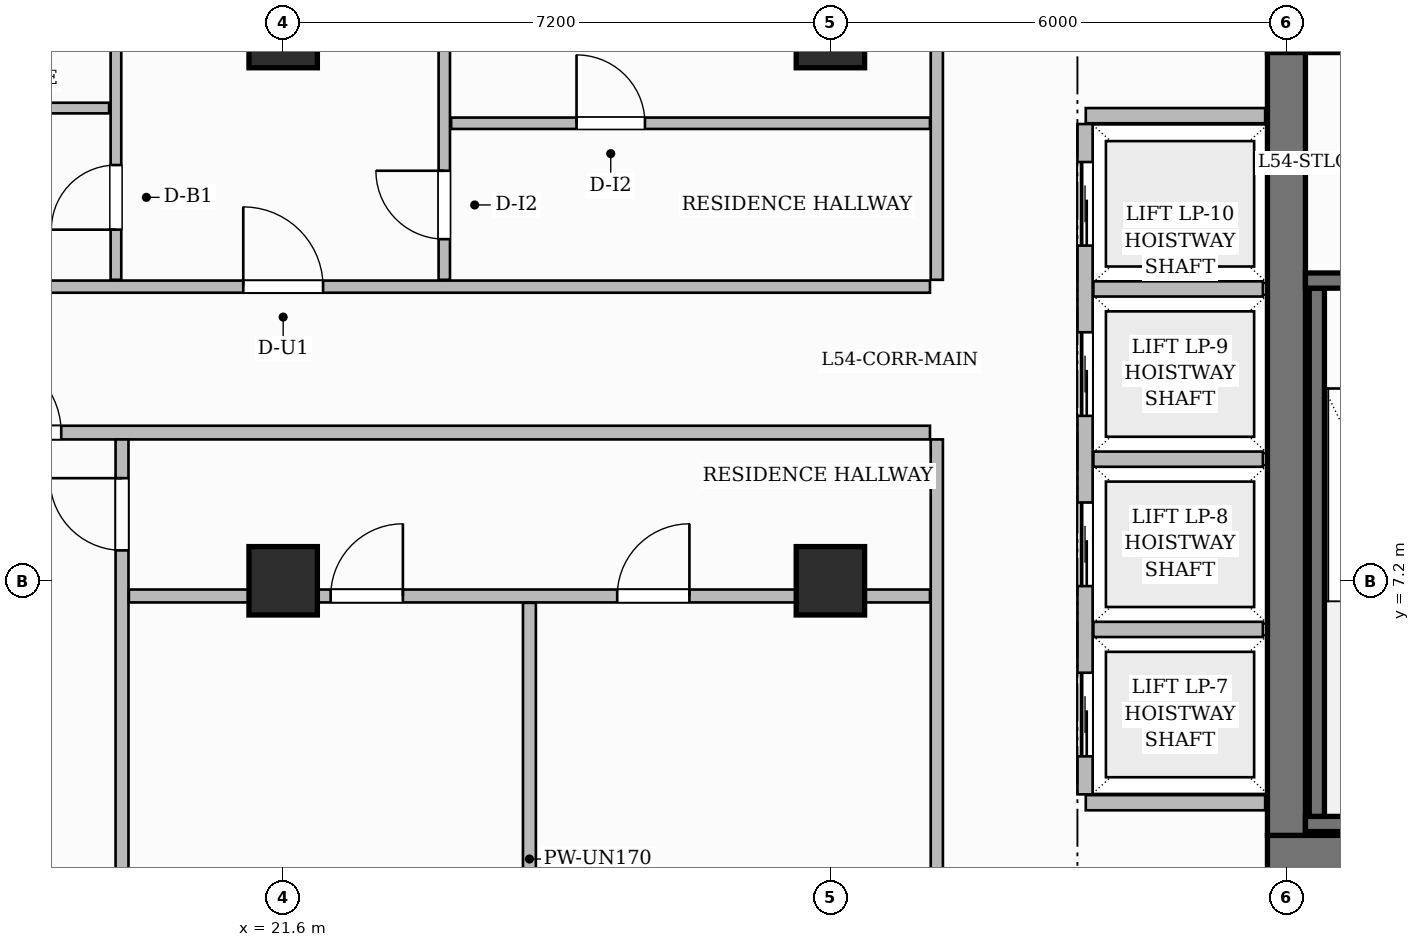
"""IFC4 building model, lengths in metres.
Left out: names, types, materials, properties, quantities, classifications, styles, units other than length and angle.
Written with IfcOpenShell. Run it as: python <this file> out.ifc"""

import sys

from ifc_helpers import new_model, si_unit, direction, frame, frame_2d, origin, origin_2d, place, context, subcontext, project, spatial, rectangle, extrude, source, transform, mapped, element, fill, save


model = new_model("IFC4")
c1 = context("Model", 3, precision=1e-05, world=origin(), true_north=direction((0.0, 1.0)))
c2 = subcontext(c1, "Body", "Model", "MODEL_VIEW")
j1 = project(units=[si_unit("LENGTHUNIT", "METRE"), si_unit("PLANEANGLEUNIT", "RADIAN")], contexts=[c1])
p1 = place(None, origin())
s1 = spatial("IfcSite", under=j1, at=p1, CompositionType="ELEMENT")
p2 = place(p1, origin())
s2 = spatial("IfcBuilding", under=s1, at=p2, CompositionType="ELEMENT")
p3 = place(p2, frame((0.0, 0.0, 217.3)))
s3 = spatial("IfcBuildingStorey", under=s2, at=p3, CompositionType="ELEMENT", Elevation=217.3)
p4 = place(p3, frame((34.55, 3.6, 0.0), z_axis=(0.0, 0.0, 1.0), x_axis=(1.0, 0.0, 0.0)))
e1 = element("IfcWall", 1, at=p4, inside=s3, PredefinedType="SHEAR", context=c2, shape_type="SweptSolid", body=[
    extrude(rectangle(XDim=15.5, YDim=0.5, at=frame_2d((7.75, 0.0))), origin(), (0.0, 0.0, 1.0), 3.85),
])
p5 = place(p4, frame((4.45, 0.0, 0.0)))
e2 = element("IfcOpeningElement", 2, at=p5, cuts=e1, PredefinedType="OPENING", context=c2, shape_type="SweptSolid", body=[
    extrude(rectangle(XDim=0.9, YDim=2.1, at=frame_2d((0.45, 1.05))), frame((0.0, 0.26, 0.0), z_axis=(0.0, -1.0, 0.0), x_axis=(1.0, 0.0, 0.0)), (0.0, 0.0, 1.0), 0.52),
])
p6 = place(p4, frame((6.9, 0.0, 0.0)))
e3 = element("IfcOpeningElement", 3, at=p6, cuts=e1, PredefinedType="OPENING", context=c2, shape_type="SweptSolid", body=[
    extrude(rectangle(XDim=0.9, YDim=2.1, at=frame_2d((0.45, 1.05))), frame((0.0, 0.26, 0.0), z_axis=(0.0, -1.0, 0.0), x_axis=(1.0, 0.0, 0.0)), (0.0, 0.0, 1.0), 0.52),
])
p7 = place(p3, frame((34.55, 14.4, 0.0), z_axis=(0.0, 0.0, 1.0), x_axis=(1.0, 0.0, 0.0)))
e4 = element("IfcWall", 4, at=p7, inside=s3, PredefinedType="SHEAR", context=c2, shape_type="SweptSolid", body=[
    extrude(rectangle(XDim=15.5, YDim=0.5, at=frame_2d((7.75, 0.0))), origin(), (0.0, 0.0, 1.0), 3.85),
])
p8 = place(p7, frame((5.38, 0.0, 0.0)))
e5 = element("IfcOpeningElement", 5, at=p8, cuts=e4, PredefinedType="OPENING", context=c2, shape_type="SweptSolid", body=[
    extrude(rectangle(XDim=1.5, YDim=2.2, at=frame_2d((0.75, 1.1))), frame((0.0, 0.26, 0.0), z_axis=(0.0, -1.0, 0.0), x_axis=(1.0, 0.0, 0.0)), (0.0, 0.0, 1.0), 0.52),
])
p9 = place(p7, frame((1.595, 0.0, 0.0)))
e6 = element("IfcOpeningElement", 6, at=p9, cuts=e4, PredefinedType="OPENING", context=c2, shape_type="SweptSolid", body=[
    extrude(rectangle(XDim=1.05, YDim=2.15, at=frame_2d((0.525, 1.075))), frame((0.0, 0.26, 0.0), z_axis=(0.0, -1.0, 0.0), x_axis=(1.0, 0.0, 0.0)), (0.0, 0.0, 1.0), 0.52),
])
p10 = place(p7, frame((11.225, 0.0, 0.0)))
e7 = element("IfcOpeningElement", 7, at=p10, cuts=e4, PredefinedType="OPENING", context=c2, shape_type="SweptSolid", body=[
    extrude(rectangle(XDim=1.05, YDim=2.15, at=frame_2d((0.525, 1.075))), frame((0.0, 0.26, 0.0), z_axis=(0.0, -1.0, 0.0), x_axis=(1.0, 0.0, 0.0)), (0.0, 0.0, 1.0), 0.52),
])
p11 = place(p3, frame((34.8, 3.85, 0.0), z_axis=(0.0, 0.0, 1.0), x_axis=(0.0, 1.0, 0.0)))
e8 = element("IfcWall", 8, at=p11, inside=s3, PredefinedType="SHEAR", context=c2, shape_type="SweptSolid", body=[
    extrude(rectangle(XDim=10.3, YDim=0.5, at=frame_2d((5.15, 0.0))), origin(), (0.0, 0.0, 1.0), 3.85),
])
m1 = source(origin(), c2, "Body", "SweptSolid", [
    extrude(rectangle(XDim=0.9, YDim=0.9, at=origin_2d()), origin(), (0.0, 0.0, 1.0), 3.85),
])
for number, where, z_axis, x_axis in (
    (9, (21.6, 7.2, 0.0), (0.0, 0.0, 1.0), (1.0, 0.0, 0.0)),
    (10, (21.6, 14.4, 0.0), (0.0, 0.0, 1.0), (1.0, 0.0, 0.0)),
    (11, (28.8, 7.2, 0.0), (0.0, 0.0, 1.0), (1.0, 0.0, 0.0)),
    (12, (28.8, 14.4, 0.0), (0.0, 0.0, 1.0), (1.0, 0.0, 0.0)),
):
    element("IfcColumn", number, at=place(p3, frame(where, z_axis=z_axis, x_axis=x_axis)), inside=s3, PredefinedType="COLUMN", context=c2, shape_type="MappedRepresentation", body=[
        mapped(m1, transform((0.0, 0.0, 0.0), scale=1.0)),
    ])
p12 = place(p3, frame((35.05, 4.0, 0.0), z_axis=(0.0, 0.0, 1.0), x_axis=(1.0, 0.0, 0.0)))
e13 = element("IfcWall", 13, at=p12, inside=s3, PredefinedType="SHEAR", context=c2, shape_type="SweptSolid", body=[
    extrude(rectangle(XDim=3.19, YDim=0.2, at=frame_2d((1.595, 0.0))), origin(), (0.0, 0.0, 1.0), 3.85),
])
p13 = place(p3, frame((35.2, 4.1, 0.0), z_axis=(0.0, 0.0, 1.0), x_axis=(0.0, 1.0, 0.0)))
e14 = element("IfcWall", 14, at=p13, inside=s3, PredefinedType="SHEAR", context=c2, shape_type="SweptSolid", body=[
    extrude(rectangle(XDim=6.95, YDim=0.2, at=frame_2d((3.475, 0.0))), origin(), (0.0, 0.0, 1.0), 3.85),
])
p14 = place(p3, frame((35.05, 11.15, 0.0), z_axis=(0.0, 0.0, 1.0), x_axis=(1.0, 0.0, 0.0)))
e15 = element("IfcWall", 15, at=p14, inside=s3, PredefinedType="SHEAR", context=c2, shape_type="SweptSolid", body=[
    extrude(rectangle(XDim=3.19, YDim=0.2, at=frame_2d((1.595, 0.0))), origin(), (0.0, 0.0, 1.0), 3.85),
])
p15 = place(p14, frame((1.095, 0.0, 0.0)))
e16 = element("IfcOpeningElement", 16, at=p15, cuts=e15, PredefinedType="OPENING", context=c2, shape_type="SweptSolid", body=[
    extrude(rectangle(XDim=1.05, YDim=2.2, at=frame_2d((0.525, 1.1))), frame((0.0, 0.11, 0.0), z_axis=(0.0, -1.0, 0.0), x_axis=(1.0, 0.0, 0.0)), (0.0, 0.0, 1.0), 0.22),
])
for number, where, z_axis, x_axis in (
    (17, (32.16, 4.28, 0.0), (0.0, 0.0, 1.0), (1.0, 0.0, 0.0)),
    (18, (32.16, 13.32, 0.0), (0.0, 0.0, 1.0), (1.0, 0.0, 0.0)),
):
    element("IfcWall", number, at=place(p3, frame(where, z_axis=z_axis, x_axis=x_axis)), inside=s3, PredefinedType="PARTITIONING", context=c2, shape_type="SweptSolid", body=[
        extrude(rectangle(XDim=2.36, YDim=0.2, at=frame_2d((1.18, 0.0))), origin(), (0.0, 0.0, 1.0), 3.6),
    ])
p16 = place(p3, frame((32.15, 4.39, 0.0), z_axis=(0.0, 0.0, 1.0), x_axis=(0.0, 1.0, 0.0)))
e19 = element("IfcWall", 19, at=p16, inside=s3, PredefinedType="PARTITIONING", context=c2, shape_type="SweptSolid", body=[
    extrude(rectangle(XDim=8.82, YDim=0.2, at=frame_2d((4.41, 0.0))), origin(), (0.0, 0.0, 1.0), 3.6),
])
p17 = place(p16, frame((0.5, 0.0, 0.0)))
e20 = element("IfcOpeningElement", 20, at=p17, cuts=e19, PredefinedType="OPENING", context=c2, shape_type="SweptSolid", body=[
    extrude(rectangle(XDim=1.1, YDim=2.2, at=frame_2d((0.55, 1.1))), frame((0.0, 0.11, 0.0), z_axis=(0.0, -1.0, 0.0), x_axis=(1.0, 0.0, 0.0)), (0.0, 0.0, 1.0), 0.22),
])
p18 = place(p16, frame((2.74, 0.0, 0.0)))
e21 = element("IfcOpeningElement", 21, at=p18, cuts=e19, PredefinedType="OPENING", context=c2, shape_type="SweptSolid", body=[
    extrude(rectangle(XDim=1.1, YDim=2.2, at=frame_2d((0.55, 1.1))), frame((0.0, 0.11, 0.0), z_axis=(0.0, -1.0, 0.0), x_axis=(1.0, 0.0, 0.0)), (0.0, 0.0, 1.0), 0.22),
])
p19 = place(p16, frame((4.98, 0.0, 0.0)))
e22 = element("IfcOpeningElement", 22, at=p19, cuts=e19, PredefinedType="OPENING", context=c2, shape_type="SweptSolid", body=[
    extrude(rectangle(XDim=1.1, YDim=2.2, at=frame_2d((0.55, 1.1))), frame((0.0, 0.11, 0.0), z_axis=(0.0, -1.0, 0.0), x_axis=(1.0, 0.0, 0.0)), (0.0, 0.0, 1.0), 0.22),
])
p20 = place(p16, frame((7.22, 0.0, 0.0)))
e23 = element("IfcOpeningElement", 23, at=p20, cuts=e19, PredefinedType="OPENING", context=c2, shape_type="SweptSolid", body=[
    extrude(rectangle(XDim=1.1, YDim=2.2, at=frame_2d((0.55, 1.1))), frame((0.0, 0.11, 0.0), z_axis=(0.0, -1.0, 0.0), x_axis=(1.0, 0.0, 0.0)), (0.0, 0.0, 1.0), 0.22),
])
for number, where, z_axis, x_axis in (
    (24, (32.26, 6.56, 0.0), (0.0, 0.0, 1.0), (1.0, 0.0, 0.0)),
    (25, (32.26, 8.8, 0.0), (0.0, 0.0, 1.0), (1.0, 0.0, 0.0)),
    (26, (32.26, 11.04, 0.0), (0.0, 0.0, 1.0), (1.0, 0.0, 0.0)),
):
    element("IfcWall", number, at=place(p3, frame(where, z_axis=z_axis, x_axis=x_axis)), inside=s3, PredefinedType="PARTITIONING", context=c2, shape_type="SweptSolid", body=[
        extrude(rectangle(XDim=2.23, YDim=0.2, at=frame_2d((1.115, 0.0))), origin(), (0.0, 0.0, 1.0), 3.6),
    ])
p21 = place(p3, frame((14.568, 9.15, 0.0), z_axis=(0.0, 0.0, 1.0), x_axis=(1.0, 0.0, 0.0)))
e27 = element("IfcWall", 27, at=p21, inside=s3, PredefinedType="PARTITIONING", context=c2, shape_type="SweptSolid", body=[
    extrude(rectangle(XDim=15.542, YDim=0.18, at=frame_2d((7.771, 0.0))), origin(), (0.0, 0.0, 1.0), 3.6),
])
p22 = place(p21, frame((3.062, 0.0, 0.0)))
e28 = element("IfcOpeningElement", 28, at=p22, cuts=e27, PredefinedType="OPENING", context=c2, shape_type="SweptSolid", body=[
    extrude(rectangle(XDim=1.05, YDim=2.25, at=frame_2d((0.525, 1.125))), frame((0.0, 0.1, 0.0), z_axis=(0.0, -1.0, 0.0), x_axis=(1.0, 0.0, 0.0)), (0.0, 0.0, 1.0), 0.2),
])
p23 = place(p3, frame((14.568, 11.07, 0.0), z_axis=(0.0, 0.0, 1.0), x_axis=(1.0, 0.0, 0.0)))
e29 = element("IfcWall", 29, at=p23, inside=s3, PredefinedType="PARTITIONING", context=c2, shape_type="SweptSolid", body=[
    extrude(rectangle(XDim=15.542, YDim=0.16, at=frame_2d((7.771, 0.0))), origin(), (0.0, 0.0, 1.0), 3.6),
])
p24 = place(p23, frame((0.507, 0.0, 0.0)))
e30 = element("IfcOpeningElement", 30, at=p24, cuts=e29, PredefinedType="OPENING", context=c2, shape_type="SweptSolid", body=[
    extrude(rectangle(XDim=1.4, YDim=2.35, at=frame_2d((0.7, 1.175))), frame((0.0, 0.09, 0.0), z_axis=(0.0, -1.0, 0.0), x_axis=(1.0, 0.0, 0.0)), (0.0, 0.0, 1.0), 0.18),
])
p25 = place(p23, frame((6.507, 0.0, 0.0)))
e31 = element("IfcOpeningElement", 31, at=p25, cuts=e29, PredefinedType="OPENING", context=c2, shape_type="SweptSolid", body=[
    extrude(rectangle(XDim=1.05, YDim=2.25, at=frame_2d((0.525, 1.125))), frame((0.0, 0.09, 0.0), z_axis=(0.0, -1.0, 0.0), x_axis=(1.0, 0.0, 0.0)), (0.0, 0.0, 1.0), 0.18),
])
p26 = place(p3, frame((30.2, 11.16, 0.0), z_axis=(0.0, 0.0, 1.0), x_axis=(0.0, 1.0, 0.0)))
e32 = element("IfcWall", 32, at=p26, inside=s3, PredefinedType="PARTITIONING", context=c2, shape_type="SweptSolid", body=[
    extrude(rectangle(XDim=10.3, YDim=0.16, at=frame_2d((5.15, 0.0))), origin(), (0.0, 0.0, 1.0), 3.6),
])
p27 = place(p3, frame((30.2, 0.168, 0.0), z_axis=(0.0, 0.0, 1.0), x_axis=(0.0, 1.0, 0.0)))
e33 = element("IfcWall", 33, at=p27, inside=s3, PredefinedType="PARTITIONING", context=c2, shape_type="SweptSolid", body=[
    extrude(rectangle(XDim=8.892, YDim=0.16, at=frame_2d((4.446, 0.0))), origin(), (0.0, 0.0, 1.0), 3.6),
])
p28 = place(p27, frame((1.957, 0.0, 0.0)))
e34 = element("IfcOpeningElement", 34, at=p28, cuts=e33, PredefinedType="OPENING", context=c2, shape_type="SweptSolid", body=[
    extrude(rectangle(XDim=1.05, YDim=2.15, at=frame_2d((0.525, 1.075))), frame((0.0, 0.09, 0.0), z_axis=(0.0, -1.0, 0.0), x_axis=(1.0, 0.0, 0.0)), (0.0, 0.0, 1.0), 0.18),
])
p29 = place(p3, frame((19.48, 0.168, 0.0), z_axis=(0.0, 0.0, 1.0), x_axis=(0.0, 1.0, 0.0)))
e35 = element("IfcWall", 35, at=p29, inside=s3, PredefinedType="PARTITIONING", context=c2, shape_type="SweptSolid", body=[
    extrude(rectangle(XDim=8.892, YDim=0.17, at=frame_2d((4.446, 0.0))), origin(), (0.0, 0.0, 1.0), 3.6),
])
p30 = place(p29, frame((7.432, 0.0, 0.0)))
e36 = element("IfcOpeningElement", 36, at=p30, cuts=e35, PredefinedType="OPENING", context=c2, shape_type="SweptSolid", body=[
    extrude(rectangle(XDim=0.95, YDim=2.15, at=frame_2d((0.475, 1.075))), frame((0.0, 0.095, 0.0), z_axis=(0.0, -1.0, 0.0), x_axis=(1.0, 0.0, 0.0)), (0.0, 0.0, 1.0), 0.19),
])
p31 = place(p3, frame((19.57, 7.0, 0.0), z_axis=(0.0, 0.0, 1.0), x_axis=(1.0, 0.0, 0.0)))
e37 = element("IfcWall", 37, at=p31, inside=s3, PredefinedType="PARTITIONING", context=c2, shape_type="SweptSolid", body=[
    extrude(rectangle(XDim=10.54, YDim=0.17, at=frame_2d((5.27, 0.0))), origin(), (0.0, 0.0, 1.0), 3.135),
])
p32 = place(p31, frame((2.655, 0.0, 0.0)))
e38 = element("IfcOpeningElement", 38, at=p32, cuts=e37, PredefinedType="OPENING", context=c2, shape_type="SweptSolid", body=[
    extrude(rectangle(XDim=0.95, YDim=2.15, at=frame_2d((0.475, 1.075))), frame((0.0, 0.095, 0.0), z_axis=(0.0, -1.0, 0.0), x_axis=(1.0, 0.0, 0.0)), (0.0, 0.0, 1.0), 0.19),
])
p33 = place(p31, frame((6.425, 0.0, 0.0)))
e39 = element("IfcOpeningElement", 39, at=p33, cuts=e37, PredefinedType="OPENING", context=c2, shape_type="SweptSolid", body=[
    extrude(rectangle(XDim=0.95, YDim=2.15, at=frame_2d((0.475, 1.075))), frame((0.0, 0.095, 0.0), z_axis=(0.0, -1.0, 0.0), x_axis=(1.0, 0.0, 0.0)), (0.0, 0.0, 1.0), 0.19),
])
p34 = place(p3, frame((24.84, 0.168, 0.0), z_axis=(0.0, 0.0, 1.0), x_axis=(0.0, 1.0, 0.0)))
e40 = element("IfcWall", 40, at=p34, inside=s3, PredefinedType="PARTITIONING", context=c2, shape_type="SweptSolid", body=[
    extrude(rectangle(XDim=6.742, YDim=0.17, at=frame_2d((3.371, 0.0))), origin(), (0.0, 0.0, 1.0), 3.6),
])
p35 = place(p3, frame((19.4, 11.16, 0.0), z_axis=(0.0, 0.0, 1.0), x_axis=(0.0, 1.0, 0.0)))
e41 = element("IfcWall", 41, at=p35, inside=s3, PredefinedType="PARTITIONING", context=c2, shape_type="SweptSolid", body=[
    extrude(rectangle(XDim=4.82, YDim=0.14, at=frame_2d((2.41, 0.0))), origin(), (0.0, 0.0, 1.0), 3.6),
])
p36 = place(p35, frame((0.66, 0.0, 0.0)))
e42 = element("IfcOpeningElement", 42, at=p36, cuts=e41, PredefinedType="OPENING", context=c2, shape_type="SweptSolid", body=[
    extrude(rectangle(XDim=0.85, YDim=2.1, at=frame_2d((0.425, 1.05))), frame((0.0, 0.08, 0.0), z_axis=(0.0, -1.0, 0.0), x_axis=(1.0, 0.0, 0.0)), (0.0, 0.0, 1.0), 0.16),
])
p37 = place(p35, frame((3.135, 0.0, 0.0)))
e43 = element("IfcOpeningElement", 43, at=p37, cuts=e41, PredefinedType="OPENING", context=c2, shape_type="SweptSolid", body=[
    extrude(rectangle(XDim=0.9, YDim=2.15, at=frame_2d((0.45, 1.075))), frame((0.0, 0.08, 0.0), z_axis=(0.0, -1.0, 0.0), x_axis=(1.0, 0.0, 0.0)), (0.0, 0.0, 1.0), 0.16),
])
p38 = place(p3, frame((17.24, 13.42, 0.0), z_axis=(0.0, 0.0, 1.0), x_axis=(1.0, 0.0, 0.0)))
e44 = element("IfcWall", 44, at=p38, inside=s3, PredefinedType="PARTITIONING", context=c2, shape_type="SweptSolid", body=[
    extrude(rectangle(XDim=2.07, YDim=0.14, at=frame_2d((1.035, 0.0))), origin(), (0.0, 0.0, 1.0), 3.6),
])
p39 = place(p3, frame((23.72, 11.16, 0.0), z_axis=(0.0, 0.0, 1.0), x_axis=(0.0, 1.0, 0.0)))
e45 = element("IfcWall", 45, at=p39, inside=s3, PredefinedType="PARTITIONING", context=c2, shape_type="SweptSolid", body=[
    extrude(rectangle(XDim=10.272, YDim=0.15, at=frame_2d((5.136, 0.0))), origin(), (0.0, 0.0, 1.0), 3.6),
])
p40 = place(p39, frame((0.535, 0.0, 0.0)))
e46 = element("IfcOpeningElement", 46, at=p40, cuts=e45, PredefinedType="OPENING", context=c2, shape_type="SweptSolid", body=[
    extrude(rectangle(XDim=0.9, YDim=2.15, at=frame_2d((0.45, 1.075))), frame((0.0, 0.085, 0.0), z_axis=(0.0, -1.0, 0.0), x_axis=(1.0, 0.0, 0.0)), (0.0, 0.0, 1.0), 0.17),
])
p41 = place(p3, frame((23.81, 13.22, 0.0), z_axis=(0.0, 0.0, 1.0), x_axis=(1.0, 0.0, 0.0)))
e47 = element("IfcWall", 47, at=p41, inside=s3, PredefinedType="PARTITIONING", context=c2, shape_type="SweptSolid", body=[
    extrude(rectangle(XDim=6.3, YDim=0.15, at=frame_2d((3.15, 0.0))), origin(), (0.0, 0.0, 1.0), 3.6),
])
p42 = place(p41, frame((1.65, 0.0, 0.0)))
e48 = element("IfcOpeningElement", 48, at=p42, cuts=e47, PredefinedType="OPENING", context=c2, shape_type="SweptSolid", body=[
    extrude(rectangle(XDim=0.9, YDim=2.15, at=frame_2d((0.45, 1.075))), frame((0.0, 0.085, 0.0), z_axis=(0.0, -1.0, 0.0), x_axis=(1.0, 0.0, 0.0)), (0.0, 0.0, 1.0), 0.17),
])
m2 = source(origin(), c2, "Body", "SweptSolid", [
    extrude(rectangle(XDim=1.05, YDim=2.25, at=frame_2d((0.525, 1.125))), frame((0.0, 0.025, 0.0), z_axis=(0.0, -1.0, 0.0), x_axis=(1.0, 0.0, 0.0)), (0.0, 0.0, 1.0), 0.05),
])
p43 = place(p22, origin())
e49 = element("IfcDoor", 49, at=p43, inside=s3, OperationType="SINGLE_SWING_LEFT", PredefinedType="DOOR", context=c2, shape_type="MappedRepresentation", body=[
    mapped(m2, transform((0.0, 0.0, 0.0), scale=1.0)),
])
fill(e28, e49)
m3 = source(origin(), c2, "Body", "SweptSolid", [
    extrude(rectangle(XDim=0.95, YDim=2.15, at=frame_2d((0.475, 1.075))), frame((0.0, 0.025, 0.0), z_axis=(0.0, -1.0, 0.0), x_axis=(1.0, 0.0, 0.0)), (0.0, 0.0, 1.0), 0.05),
])
p44 = place(p30, origin())
e50 = element("IfcDoor", 50, at=p44, inside=s3, OperationType="SINGLE_SWING_RIGHT", PredefinedType="DOOR", context=c2, shape_type="MappedRepresentation", body=[
    mapped(m3, transform((0.0, 0.0, 0.0), scale=1.0)),
])
fill(e36, e50)
p45 = place(p32, origin())
e51 = element("IfcDoor", 51, at=p45, inside=s3, OperationType="SINGLE_SWING_RIGHT", PredefinedType="DOOR", context=c2, shape_type="MappedRepresentation", body=[
    mapped(m3, transform((0.0, 0.0, 0.0), scale=1.0)),
])
fill(e38, e51)
p46 = place(p33, origin())
e52 = element("IfcDoor", 52, at=p46, inside=s3, OperationType="SINGLE_SWING_RIGHT", PredefinedType="DOOR", context=c2, shape_type="MappedRepresentation", body=[
    mapped(m3, transform((0.0, 0.0, 0.0), scale=1.0)),
])
fill(e39, e52)
m4 = source(origin(), c2, "Body", "SweptSolid", [
    extrude(rectangle(XDim=0.85, YDim=2.1, at=frame_2d((0.425, 1.05))), frame((0.0, 0.025, 0.0), z_axis=(0.0, -1.0, 0.0), x_axis=(1.0, 0.0, 0.0)), (0.0, 0.0, 1.0), 0.05),
])
p47 = place(p36, origin())
e53 = element("IfcDoor", 53, at=p47, inside=s3, OperationType="SINGLE_SWING_LEFT", PredefinedType="DOOR", context=c2, shape_type="MappedRepresentation", body=[
    mapped(m4, transform((0.0, 0.0, 0.0), scale=1.0)),
])
fill(e42, e53)
p48 = place(p25, origin())
e54 = element("IfcDoor", 54, at=p48, inside=s3, OperationType="SINGLE_SWING_LEFT", PredefinedType="DOOR", context=c2, shape_type="MappedRepresentation", body=[
    mapped(m2, transform((0.0, 0.0, 0.0), scale=1.0)),
])
fill(e31, e54)
m5 = source(origin(), c2, "Body", "SweptSolid", [
    extrude(rectangle(XDim=0.9, YDim=2.15, at=frame_2d((0.45, 1.075))), frame((0.0, 0.025, 0.0), z_axis=(0.0, -1.0, 0.0), x_axis=(1.0, 0.0, 0.0)), (0.0, 0.0, 1.0), 0.05),
])
p49 = place(p40, origin())
e55 = element("IfcDoor", 55, at=p49, inside=s3, OperationType="SINGLE_SWING_RIGHT", PredefinedType="DOOR", context=c2, shape_type="MappedRepresentation", body=[
    mapped(m5, transform((0.0, 0.0, 0.0), scale=1.0)),
])
fill(e46, e55)
p50 = place(p42, origin())
e56 = element("IfcDoor", 56, at=p50, inside=s3, OperationType="SINGLE_SWING_LEFT", PredefinedType="DOOR", context=c2, shape_type="MappedRepresentation", body=[
    mapped(m5, transform((0.0, 0.0, 0.0), scale=1.0)),
])
fill(e48, e56)
m6 = source(origin(), c2, "Body", "SweptSolid", [
    extrude(rectangle(XDim=1.1, YDim=2.2, at=frame_2d((0.55, 1.1))), frame((0.0, 0.025, 0.0), z_axis=(0.0, -1.0, 0.0), x_axis=(1.0, 0.0, 0.0)), (0.0, 0.0, 1.0), 0.05),
])
p51 = place(p17, origin())
e57 = element("IfcDoor", 57, at=p51, inside=s3, OperationType="SLIDING_TO_LEFT", PredefinedType="DOOR", context=c2, shape_type="MappedRepresentation", body=[
    mapped(m6, transform((0.0, 0.0, 0.0), scale=1.0)),
])
fill(e20, e57)
p52 = place(p18, origin())
e58 = element("IfcDoor", 58, at=p52, inside=s3, OperationType="SLIDING_TO_LEFT", PredefinedType="DOOR", context=c2, shape_type="MappedRepresentation", body=[
    mapped(m6, transform((0.0, 0.0, 0.0), scale=1.0)),
])
fill(e21, e58)
p53 = place(p19, origin())
e59 = element("IfcDoor", 59, at=p53, inside=s3, OperationType="SLIDING_TO_LEFT", PredefinedType="DOOR", context=c2, shape_type="MappedRepresentation", body=[
    mapped(m6, transform((0.0, 0.0, 0.0), scale=1.0)),
])
fill(e22, e59)
p54 = place(p20, origin())
e60 = element("IfcDoor", 60, at=p54, inside=s3, OperationType="SLIDING_TO_LEFT", PredefinedType="DOOR", context=c2, shape_type="MappedRepresentation", body=[
    mapped(m6, transform((0.0, 0.0, 0.0), scale=1.0)),
])
fill(e23, e60)
save(model, sys.argv[1])
